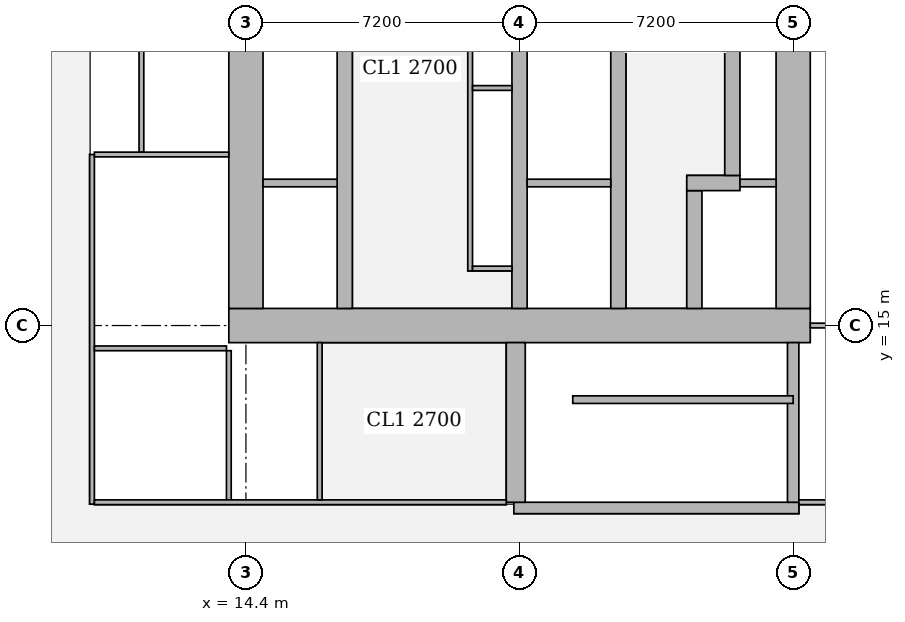
"""IFC4 building model, lengths in metres.
Left out: names, types, materials, properties, quantities, classifications, styles, units other than length and angle.
Written with IfcOpenShell. Run it as: python <this file> out.ifc"""

import sys

from ifc_helpers import new_model, si_unit, direction, frame, frame_2d, origin, place, context, subcontext, project, spatial, rectangle, extrude, element, fill, save


model = new_model("IFC4")
c1 = context("Model", 3, precision=1e-05, world=origin(), true_north=direction((0.0, 1.0)))
c2 = subcontext(c1, "Body", "Model", "MODEL_VIEW")
j1 = project(units=[si_unit("LENGTHUNIT", "METRE"), si_unit("PLANEANGLEUNIT", "RADIAN")], contexts=[c1])
p1 = place(None, origin())
s1 = spatial("IfcSite", under=j1, at=p1, CompositionType="ELEMENT")
p2 = place(p1, origin())
s2 = spatial("IfcBuilding", under=s1, at=p2, CompositionType="ELEMENT")
p3 = place(p2, frame((0.0, 0.0, 42.5)))
s3 = spatial("IfcBuildingStorey", under=s2, at=p3, CompositionType="ELEMENT", Elevation=42.5)
p4 = place(p3, frame((13.95, 15.0, 0.0), z_axis=(0.0, 0.0, 1.0), x_axis=(1.0, 0.0, 0.0)))
e1 = element("IfcWall", 1, at=p4, inside=s3, PredefinedType="SHEAR", context=c2, shape_type="SweptSolid", body=[
    extrude(rectangle(XDim=15.3, YDim=0.9, at=frame_2d((7.65, 0.0))), origin(), (0.0, 0.0, 1.0), 3.75),
])
p5 = place(p4, frame((4.45, 0.0, 0.0)))
e2 = element("IfcOpeningElement", 2, at=p5, cuts=e1, PredefinedType="OPENING", context=c2, shape_type="SweptSolid", body=[
    extrude(rectangle(XDim=1.8, YDim=2.1, at=frame_2d((0.9, 1.05))), frame((0.0, 0.46, 0.0), z_axis=(0.0, -1.0, 0.0), x_axis=(1.0, 0.0, 0.0)), (0.0, 0.0, 1.0), 0.92),
])
p6 = place(p4, frame((10.7, 0.0, 0.0)))
e3 = element("IfcOpeningElement", 3, at=p6, cuts=e1, PredefinedType="OPENING", context=c2, shape_type="SweptSolid", body=[
    extrude(rectangle(XDim=1.1, YDim=2.1, at=frame_2d((0.55, 1.05))), frame((0.0, 0.46, 0.0), z_axis=(0.0, -1.0, 0.0), x_axis=(1.0, 0.0, 0.0)), (0.0, 0.0, 1.0), 0.92),
])
for number, where, z_axis, x_axis in (
    (4, (14.4, 15.45, 0.0), (0.0, 0.0, 1.0), (0.0, 1.0, 0.0)),
    (5, (28.8, 15.45, 0.0), (0.0, 0.0, 1.0), (0.0, 1.0, 0.0)),
):
    element("IfcWall", number, at=place(p3, frame(where, z_axis=z_axis, x_axis=x_axis)), inside=s3, PredefinedType="SHEAR", context=c2, shape_type="SweptSolid", body=[
        extrude(rectangle(XDim=14.1, YDim=0.9, at=frame_2d((7.05, 0.0))), origin(), (0.0, 0.0, 1.0), 3.75),
    ])
p7 = place(p3, frame((17.0, 15.45, 0.0), z_axis=(0.0, 0.0, 1.0), x_axis=(0.0, 1.0, 0.0)))
e6 = element("IfcWall", 6, at=p7, inside=s3, PredefinedType="SHEAR", context=c2, shape_type="SweptSolid", body=[
    extrude(rectangle(XDim=14.1, YDim=0.4, at=frame_2d((7.05, 0.0))), origin(), (0.0, 0.0, 1.0), 3.75),
])
p8 = place(p7, frame((0.875, 0.0, 0.0)))
e7 = element("IfcOpeningElement", 7, at=p8, cuts=e6, PredefinedType="OPENING", context=c2, shape_type="SweptSolid", body=[
    extrude(rectangle(XDim=1.1, YDim=2.1, at=frame_2d((0.55, 1.05))), frame((0.0, 0.21, 0.0), z_axis=(0.0, -1.0, 0.0), x_axis=(1.0, 0.0, 0.0)), (0.0, 0.0, 1.0), 0.42),
])
p9 = place(p7, frame((4.625, 0.0, 0.0)))
e8 = element("IfcOpeningElement", 8, at=p9, cuts=e6, PredefinedType="OPENING", context=c2, shape_type="SweptSolid", body=[
    extrude(rectangle(XDim=1.1, YDim=2.1, at=frame_2d((0.55, 1.05))), frame((0.0, 0.21, 0.0), z_axis=(0.0, -1.0, 0.0), x_axis=(1.0, 0.0, 0.0)), (0.0, 0.0, 1.0), 0.42),
])
p10 = place(p7, frame((8.375, 0.0, 0.0)))
e9 = element("IfcOpeningElement", 9, at=p10, cuts=e6, PredefinedType="OPENING", context=c2, shape_type="SweptSolid", body=[
    extrude(rectangle(XDim=1.1, YDim=2.1, at=frame_2d((0.55, 1.05))), frame((0.0, 0.21, 0.0), z_axis=(0.0, -1.0, 0.0), x_axis=(1.0, 0.0, 0.0)), (0.0, 0.0, 1.0), 0.42),
])
p11 = place(p7, frame((12.125, 0.0, 0.0)))
e10 = element("IfcOpeningElement", 10, at=p11, cuts=e6, PredefinedType="OPENING", context=c2, shape_type="SweptSolid", body=[
    extrude(rectangle(XDim=1.1, YDim=2.1, at=frame_2d((0.55, 1.05))), frame((0.0, 0.21, 0.0), z_axis=(0.0, -1.0, 0.0), x_axis=(1.0, 0.0, 0.0)), (0.0, 0.0, 1.0), 0.42),
])
for number, where, z_axis, x_axis in (
    (11, (21.6, 15.45, 0.0), (0.0, 0.0, 1.0), (0.0, 1.0, 0.0)),
    (12, (24.2, 15.45, 0.0), (0.0, 0.0, 1.0), (0.0, 1.0, 0.0)),
):
    element("IfcWall", number, at=place(p3, frame(where, z_axis=z_axis, x_axis=x_axis)), inside=s3, PredefinedType="SHEAR", context=c2, shape_type="SweptSolid", body=[
        extrude(rectangle(XDim=14.1, YDim=0.4, at=frame_2d((7.05, 0.0))), origin(), (0.0, 0.0, 1.0), 3.75),
    ])
p12 = place(p3, frame((26.2, 15.45, 0.0), z_axis=(0.0, 0.0, 1.0), x_axis=(0.0, 1.0, 0.0)))
e13 = element("IfcWall", 13, at=p12, inside=s3, PredefinedType="SHEAR", context=c2, shape_type="SweptSolid", body=[
    extrude(rectangle(XDim=3.1, YDim=0.4, at=frame_2d((1.55, 0.0))), origin(), (0.0, 0.0, 1.0), 3.75),
])
p13 = place(p12, frame((0.825, 0.0, 0.0)))
e14 = element("IfcOpeningElement", 14, at=p13, cuts=e13, PredefinedType="OPENING", context=c2, shape_type="SweptSolid", body=[
    extrude(rectangle(XDim=1.2, YDim=2.1, at=frame_2d((0.6, 1.05))), frame((0.0, 0.21, 0.0), z_axis=(0.0, -1.0, 0.0), x_axis=(1.0, 0.0, 0.0)), (0.0, 0.0, 1.0), 0.42),
])
p14 = place(p3, frame((26.0, 18.75, 0.0), z_axis=(0.0, 0.0, 1.0), x_axis=(1.0, 0.0, 0.0)))
e15 = element("IfcWall", 15, at=p14, inside=s3, PredefinedType="SHEAR", context=c2, shape_type="SweptSolid", body=[
    extrude(rectangle(XDim=1.4, YDim=0.4, at=frame_2d((0.7, 0.0))), origin(), (0.0, 0.0, 1.0), 3.75),
])
p15 = place(p3, frame((27.2, 18.95, 0.0), z_axis=(0.0, 0.0, 1.0), x_axis=(0.0, 1.0, 0.0)))
e16 = element("IfcWall", 16, at=p15, inside=s3, PredefinedType="SHEAR", context=c2, shape_type="SweptSolid", body=[
    extrude(rectangle(XDim=7.1, YDim=0.4, at=frame_2d((3.55, 0.0))), origin(), (0.0, 0.0, 1.0), 3.75),
])
p16 = place(p3, frame((21.45, 10.2, 0.0), z_axis=(0.0, 0.0, 1.0), x_axis=(1.0, 0.0, 0.0)))
e17 = element("IfcWall", 17, at=p16, inside=s3, PredefinedType="SHEAR", context=c2, shape_type="SweptSolid", body=[
    extrude(rectangle(XDim=7.5, YDim=0.3, at=frame_2d((3.75, 0.0))), origin(), (0.0, 0.0, 1.0), 3.75),
])
p17 = place(p16, frame((0.5, 0.0, 0.0)))
e18 = element("IfcOpeningElement", 18, at=p17, cuts=e17, PredefinedType="OPENING", context=c2, shape_type="SweptSolid", body=[
    extrude(rectangle(XDim=1.1, YDim=2.1, at=frame_2d((0.55, 1.05))), frame((0.0, 0.16, 0.0), z_axis=(0.0, -1.0, 0.0), x_axis=(1.0, 0.0, 0.0)), (0.0, 0.0, 1.0), 0.32),
])
p18 = place(p3, frame((21.5, 10.35, 0.0), z_axis=(0.0, 0.0, 1.0), x_axis=(0.0, 1.0, 0.0)))
e19 = element("IfcWall", 19, at=p18, inside=s3, PredefinedType="SHEAR", context=c2, shape_type="SweptSolid", body=[
    extrude(rectangle(XDim=4.2, YDim=0.5, at=frame_2d((2.1, 0.0))), origin(), (0.0, 0.0, 1.0), 3.75),
])
p19 = place(p3, frame((28.8, 10.35, 0.0), z_axis=(0.0, 0.0, 1.0), x_axis=(0.0, 1.0, 0.0)))
e20 = element("IfcWall", 20, at=p19, inside=s3, PredefinedType="SHEAR", context=c2, shape_type="SweptSolid", body=[
    extrude(rectangle(XDim=4.2, YDim=0.3, at=frame_2d((2.1, 0.0))), origin(), (0.0, 0.0, 1.0), 3.75),
])
p20 = place(p3, frame((10.35, 10.3, 0.0), z_axis=(0.0, 0.0, 1.0), x_axis=(0.0, 1.0, 0.0)))
e21 = element("IfcWall", 21, at=p20, inside=s3, PredefinedType="PARTITIONING", context=c2, shape_type="SweptSolid", body=[
    extrude(rectangle(XDim=9.2, YDim=0.125, at=frame_2d((4.6, 0.0))), origin(), (0.0, 0.0, 1.0), 3.5),
])
p21 = place(p20, frame((1.55, 0.0, 0.0)))
e22 = element("IfcOpeningElement", 22, at=p21, cuts=e21, PredefinedType="OPENING", context=c2, shape_type="SweptSolid", body=[
    extrude(rectangle(XDim=1.0, YDim=2.1, at=frame_2d((0.5, 1.05))), frame((0.0, 0.073, 0.0), z_axis=(0.0, -1.0, 0.0), x_axis=(1.0, 0.0, 0.0)), (0.0, 0.0, 1.0), 0.145),
])
p22 = place(p20, frame((6.15, 0.0, 0.0)))
e23 = element("IfcOpeningElement", 23, at=p22, cuts=e21, PredefinedType="OPENING", context=c2, shape_type="SweptSolid", body=[
    extrude(rectangle(XDim=1.0, YDim=2.1, at=frame_2d((0.5, 1.05))), frame((0.0, 0.073, 0.0), z_axis=(0.0, -1.0, 0.0), x_axis=(1.0, 0.0, 0.0)), (0.0, 0.0, 1.0), 0.145),
])
p23 = place(p3, frame((11.65, 19.562, 0.0), z_axis=(0.0, 0.0, 1.0), x_axis=(0.0, 1.0, 0.0)))
e24 = element("IfcWall", 24, at=p23, inside=s3, PredefinedType="PARTITIONING", context=c2, shape_type="SweptSolid", body=[
    extrude(rectangle(XDim=8.876, YDim=0.125, at=frame_2d((4.438, 0.0))), origin(), (0.0, 0.0, 1.0), 3.5),
])
p24 = place(p23, frame((3.938, 0.0, 0.0)))
e25 = element("IfcOpeningElement", 25, at=p24, cuts=e24, PredefinedType="OPENING", context=c2, shape_type="SweptSolid", body=[
    extrude(rectangle(XDim=1.0, YDim=2.1, at=frame_2d((0.5, 1.05))), frame((0.0, 0.073, 0.0), z_axis=(0.0, -1.0, 0.0), x_axis=(1.0, 0.0, 0.0)), (0.0, 0.0, 1.0), 0.145),
])
p25 = place(p3, frame((10.413, 14.4, 0.0), z_axis=(0.0, 0.0, 1.0), x_axis=(1.0, 0.0, 0.0)))
e26 = element("IfcWall", 26, at=p25, inside=s3, PredefinedType="PARTITIONING", context=c2, shape_type="SweptSolid", body=[
    extrude(rectangle(XDim=3.475, YDim=0.125, at=frame_2d((1.737, 0.0))), origin(), (0.0, 0.0, 1.0), 3.5),
])
p26 = place(p3, frame((10.413, 19.5, 0.0), z_axis=(0.0, 0.0, 1.0), x_axis=(1.0, 0.0, 0.0)))
e27 = element("IfcWall", 27, at=p26, inside=s3, PredefinedType="PARTITIONING", context=c2, shape_type="SweptSolid", body=[
    extrude(rectangle(XDim=3.537, YDim=0.125, at=frame_2d((1.769, 0.0))), origin(), (0.0, 0.0, 1.0), 3.5),
])
p27 = place(p3, frame((13.95, 10.413, 0.0), z_axis=(0.0, 0.0, 1.0), x_axis=(0.0, 1.0, 0.0)))
e28 = element("IfcWall", 28, at=p27, inside=s3, PredefinedType="PARTITIONING", context=c2, shape_type="SweptSolid", body=[
    extrude(rectangle(XDim=3.925, YDim=0.125, at=frame_2d((1.962, 0.0))), origin(), (0.0, 0.0, 1.0), 3.5),
])
p28 = place(p3, frame((10.413, 10.35, 0.0), z_axis=(0.0, 0.0, 1.0), x_axis=(1.0, 0.0, 0.0)))
e29 = element("IfcWall", 29, at=p28, inside=s3, PredefinedType="PARTITIONING", context=c2, shape_type="SweptSolid", body=[
    extrude(rectangle(XDim=10.837, YDim=0.125, at=frame_2d((5.418, 0.0))), origin(), (0.0, 0.0, 1.0), 3.5),
])
p29 = place(p28, frame((7.582, 0.0, 0.0)))
e30 = element("IfcOpeningElement", 30, at=p29, cuts=e29, PredefinedType="OPENING", context=c2, shape_type="SweptSolid", body=[
    extrude(rectangle(XDim=1.8, YDim=2.1, at=frame_2d((0.9, 1.05))), frame((0.0, 0.073, 0.0), z_axis=(0.0, -1.0, 0.0), x_axis=(1.0, 0.0, 0.0)), (0.0, 0.0, 1.0), 0.145),
])
p30 = place(p3, frame((16.34, 10.413, 0.0), z_axis=(0.0, 0.0, 1.0), x_axis=(0.0, 1.0, 0.0)))
e31 = element("IfcWall", 31, at=p30, inside=s3, PredefinedType="PARTITIONING", context=c2, shape_type="SweptSolid", body=[
    extrude(rectangle(XDim=4.137, YDim=0.125, at=frame_2d((2.068, 0.0))), origin(), (0.0, 0.0, 1.0), 3.5),
])
p31 = place(p30, frame((1.512, 0.0, 0.0)))
e32 = element("IfcOpeningElement", 32, at=p31, cuts=e31, PredefinedType="OPENING", context=c2, shape_type="SweptSolid", body=[
    extrude(rectangle(XDim=1.0, YDim=2.1, at=frame_2d((0.5, 1.05))), frame((0.0, 0.073, 0.0), z_axis=(0.0, -1.0, 0.0), x_axis=(1.0, 0.0, 0.0)), (0.0, 0.0, 1.0), 0.145),
])
p32 = place(p3, frame((28.95, 10.35, 0.0), z_axis=(0.0, 0.0, 1.0), x_axis=(1.0, 0.0, 0.0)))
e33 = element("IfcWall", 33, at=p32, inside=s3, PredefinedType="PARTITIONING", context=c2, shape_type="SweptSolid", body=[
    extrude(rectangle(XDim=8.886, YDim=0.125, at=frame_2d((4.443, 0.0))), origin(), (0.0, 0.0, 1.0), 3.5),
])
p33 = place(p3, frame((29.25, 15.0, 0.0), z_axis=(0.0, 0.0, 1.0), x_axis=(1.0, 0.0, 0.0)))
e34 = element("IfcWall", 34, at=p33, inside=s3, PredefinedType="PARTITIONING", context=c2, shape_type="SweptSolid", body=[
    extrude(rectangle(XDim=5.849, YDim=0.125, at=frame_2d((2.925, 0.0))), origin(), (0.0, 0.0, 1.0), 3.5),
])
p34 = place(p3, frame((20.3, 16.438, 0.0), z_axis=(0.0, 0.0, 1.0), x_axis=(0.0, 1.0, 0.0)))
e35 = element("IfcWall", 35, at=p34, inside=s3, PredefinedType="PARTITIONING", context=c2, shape_type="SweptSolid", body=[
    extrude(rectangle(XDim=10.624, YDim=0.125, at=frame_2d((5.312, 0.0))), origin(), (0.0, 0.0, 1.0), 3.5),
])
p35 = place(p34, frame((1.937, 0.0, 0.0)))
e36 = element("IfcOpeningElement", 36, at=p35, cuts=e35, PredefinedType="OPENING", context=c2, shape_type="SweptSolid", body=[
    extrude(rectangle(XDim=1.0, YDim=2.1, at=frame_2d((0.5, 1.05))), frame((0.0, 0.073, 0.0), z_axis=(0.0, -1.0, 0.0), x_axis=(1.0, 0.0, 0.0)), (0.0, 0.0, 1.0), 0.145),
])
p36 = place(p34, frame((7.187, 0.0, 0.0)))
e37 = element("IfcOpeningElement", 37, at=p36, cuts=e35, PredefinedType="OPENING", context=c2, shape_type="SweptSolid", body=[
    extrude(rectangle(XDim=1.0, YDim=2.1, at=frame_2d((0.5, 1.05))), frame((0.0, 0.073, 0.0), z_axis=(0.0, -1.0, 0.0), x_axis=(1.0, 0.0, 0.0)), (0.0, 0.0, 1.0), 0.145),
])
for number, where, z_axis, x_axis in (
    (38, (20.363, 16.5, 0.0), (0.0, 0.0, 1.0), (1.0, 0.0, 0.0)),
    (39, (20.363, 21.25, 0.0), (0.0, 0.0, 1.0), (1.0, 0.0, 0.0)),
):
    element("IfcWall", number, at=place(p3, frame(where, z_axis=z_axis, x_axis=x_axis)), inside=s3, PredefinedType="PARTITIONING", context=c2, shape_type="SweptSolid", body=[
        extrude(rectangle(XDim=1.037, YDim=0.125, at=frame_2d((0.519, 0.0))), origin(), (0.0, 0.0, 1.0), 3.5),
    ])
p37 = place(p3, frame((23.0, 13.05, 0.0), z_axis=(0.0, 0.0, 1.0), x_axis=(1.0, 0.0, 0.0)))
e40 = element("IfcWall", 40, at=p37, inside=s3, PredefinedType="SHEAR", context=c2, shape_type="SweptSolid", body=[
    extrude(rectangle(XDim=5.8, YDim=0.2, at=frame_2d((2.9, 0.0))), origin(), (0.0, 0.0, 1.0), 3.75),
])
p38 = place(p3, frame((14.85, 18.75, 0.0), z_axis=(0.0, 0.0, 1.0), x_axis=(1.0, 0.0, 0.0)))
e41 = element("IfcWall", 41, at=p38, inside=s3, PredefinedType="SOLIDWALL", context=c2, shape_type="SweptSolid", body=[
    extrude(rectangle(XDim=1.95, YDim=0.2, at=frame_2d((0.975, 0.0))), origin(), (0.0, 0.0, 1.0), 3.5),
])
p39 = place(p3, frame((21.8, 18.75, 0.0), z_axis=(0.0, 0.0, 1.0), x_axis=(1.0, 0.0, 0.0)))
e42 = element("IfcWall", 42, at=p39, inside=s3, PredefinedType="SOLIDWALL", context=c2, shape_type="SweptSolid", body=[
    extrude(rectangle(XDim=2.2, YDim=0.2, at=frame_2d((1.1, 0.0))), origin(), (0.0, 0.0, 1.0), 3.5),
])
p40 = place(p3, frame((27.4, 18.75, 0.0), z_axis=(0.0, 0.0, 1.0), x_axis=(1.0, 0.0, 0.0)))
e43 = element("IfcWall", 43, at=p40, inside=s3, PredefinedType="SOLIDWALL", context=c2, shape_type="SweptSolid", body=[
    extrude(rectangle(XDim=0.95, YDim=0.2, at=frame_2d((0.475, 0.0))), origin(), (0.0, 0.0, 1.0), 3.5),
])
p41 = place(p21, origin())
e44 = element("IfcDoor", 44, at=p41, inside=s3, OperationType="SINGLE_SWING_RIGHT", PredefinedType="DOOR", context=c2, shape_type="SweptSolid", body=[
    extrude(rectangle(XDim=1.0, YDim=2.1, at=frame_2d((0.5, 1.05))), frame((0.0, 0.025, 0.0), z_axis=(0.0, -1.0, 0.0), x_axis=(1.0, 0.0, 0.0)), (0.0, 0.0, 1.0), 0.05),
])
fill(e22, e44)
p42 = place(p22, origin())
e45 = element("IfcDoor", 45, at=p42, inside=s3, OperationType="SINGLE_SWING_LEFT", PredefinedType="DOOR", context=c2, shape_type="SweptSolid", body=[
    extrude(rectangle(XDim=1.0, YDim=2.1, at=frame_2d((0.5, 1.05))), frame((0.0, 0.025, 0.0), z_axis=(0.0, -1.0, 0.0), x_axis=(1.0, 0.0, 0.0)), (0.0, 0.0, 1.0), 0.05),
])
fill(e23, e45)
p43 = place(p31, origin())
e46 = element("IfcDoor", 46, at=p43, inside=s3, OperationType="SINGLE_SWING_LEFT", PredefinedType="DOOR", context=c2, shape_type="SweptSolid", body=[
    extrude(rectangle(XDim=1.0, YDim=2.1, at=frame_2d((0.5, 1.05))), frame((0.0, 0.025, 0.0), z_axis=(0.0, -1.0, 0.0), x_axis=(1.0, 0.0, 0.0)), (0.0, 0.0, 1.0), 0.05),
])
fill(e32, e46)
p44 = place(p29, origin())
e47 = element("IfcDoor", 47, at=p44, inside=s3, OperationType="DOUBLE_DOOR_SINGLE_SWING", PredefinedType="DOOR", context=c2, shape_type="SweptSolid", body=[
    extrude(rectangle(XDim=1.8, YDim=2.1, at=frame_2d((0.9, 1.05))), frame((0.0, 0.025, 0.0), z_axis=(0.0, -1.0, 0.0), x_axis=(1.0, 0.0, 0.0)), (0.0, 0.0, 1.0), 0.05),
])
fill(e30, e47)
p45 = place(p35, origin())
e48 = element("IfcDoor", 48, at=p45, inside=s3, OperationType="SINGLE_SWING_RIGHT", PredefinedType="DOOR", context=c2, shape_type="SweptSolid", body=[
    extrude(rectangle(XDim=1.0, YDim=2.1, at=frame_2d((0.5, 1.05))), frame((0.0, 0.025, 0.0), z_axis=(0.0, -1.0, 0.0), x_axis=(1.0, 0.0, 0.0)), (0.0, 0.0, 1.0), 0.05),
])
fill(e36, e48)
p46 = place(p5, origin())
e49 = element("IfcDoor", 49, at=p46, inside=s3, OperationType="DOUBLE_DOOR_SINGLE_SWING", PredefinedType="DOOR", context=c2, shape_type="SweptSolid", body=[
    extrude(rectangle(XDim=1.8, YDim=2.1, at=frame_2d((0.9, 1.05))), frame((0.0, 0.025, 0.0), z_axis=(0.0, -1.0, 0.0), x_axis=(1.0, 0.0, 0.0)), (0.0, 0.0, 1.0), 0.05),
])
fill(e2, e49)
p47 = place(p6, origin())
e50 = element("IfcDoor", 50, at=p47, inside=s3, OperationType="SINGLE_SWING_LEFT", PredefinedType="DOOR", context=c2, shape_type="SweptSolid", body=[
    extrude(rectangle(XDim=1.1, YDim=2.1, at=frame_2d((0.55, 1.05))), frame((0.0, 0.025, 0.0), z_axis=(0.0, -1.0, 0.0), x_axis=(1.0, 0.0, 0.0)), (0.0, 0.0, 1.0), 0.05),
])
fill(e3, e50)
p48 = place(p13, origin())
e51 = element("IfcDoor", 51, at=p48, inside=s3, OperationType="DOUBLE_DOOR_SLIDING", PredefinedType="DOOR", context=c2, shape_type="SweptSolid", body=[
    extrude(rectangle(XDim=1.2, YDim=2.1, at=frame_2d((0.6, 1.05))), frame((0.0, 0.025, 0.0), z_axis=(0.0, -1.0, 0.0), x_axis=(1.0, 0.0, 0.0)), (0.0, 0.0, 1.0), 0.05),
])
fill(e14, e51)
p49 = place(p8, origin())
e52 = element("IfcDoor", 52, at=p49, inside=s3, OperationType="DOUBLE_DOOR_SLIDING", PredefinedType="DOOR", context=c2, shape_type="SweptSolid", body=[
    extrude(rectangle(XDim=1.1, YDim=2.1, at=frame_2d((0.55, 1.05))), frame((0.0, 0.025, 0.0), z_axis=(0.0, -1.0, 0.0), x_axis=(1.0, 0.0, 0.0)), (0.0, 0.0, 1.0), 0.05),
])
fill(e7, e52)
p50 = place(p9, origin())
e53 = element("IfcDoor", 53, at=p50, inside=s3, OperationType="DOUBLE_DOOR_SLIDING", PredefinedType="DOOR", context=c2, shape_type="SweptSolid", body=[
    extrude(rectangle(XDim=1.1, YDim=2.1, at=frame_2d((0.55, 1.05))), frame((0.0, 0.025, 0.0), z_axis=(0.0, -1.0, 0.0), x_axis=(1.0, 0.0, 0.0)), (0.0, 0.0, 1.0), 0.05),
])
fill(e8, e53)
p51 = place(p17, origin())
e54 = element("IfcDoor", 54, at=p51, inside=s3, OperationType="SINGLE_SWING_LEFT", PredefinedType="DOOR", context=c2, shape_type="SweptSolid", body=[
    extrude(rectangle(XDim=1.1, YDim=2.1, at=frame_2d((0.55, 1.05))), frame((0.0, 0.025, 0.0), z_axis=(0.0, -1.0, 0.0), x_axis=(1.0, 0.0, 0.0)), (0.0, 0.0, 1.0), 0.05),
])
fill(e18, e54)
save(model, sys.argv[1])
